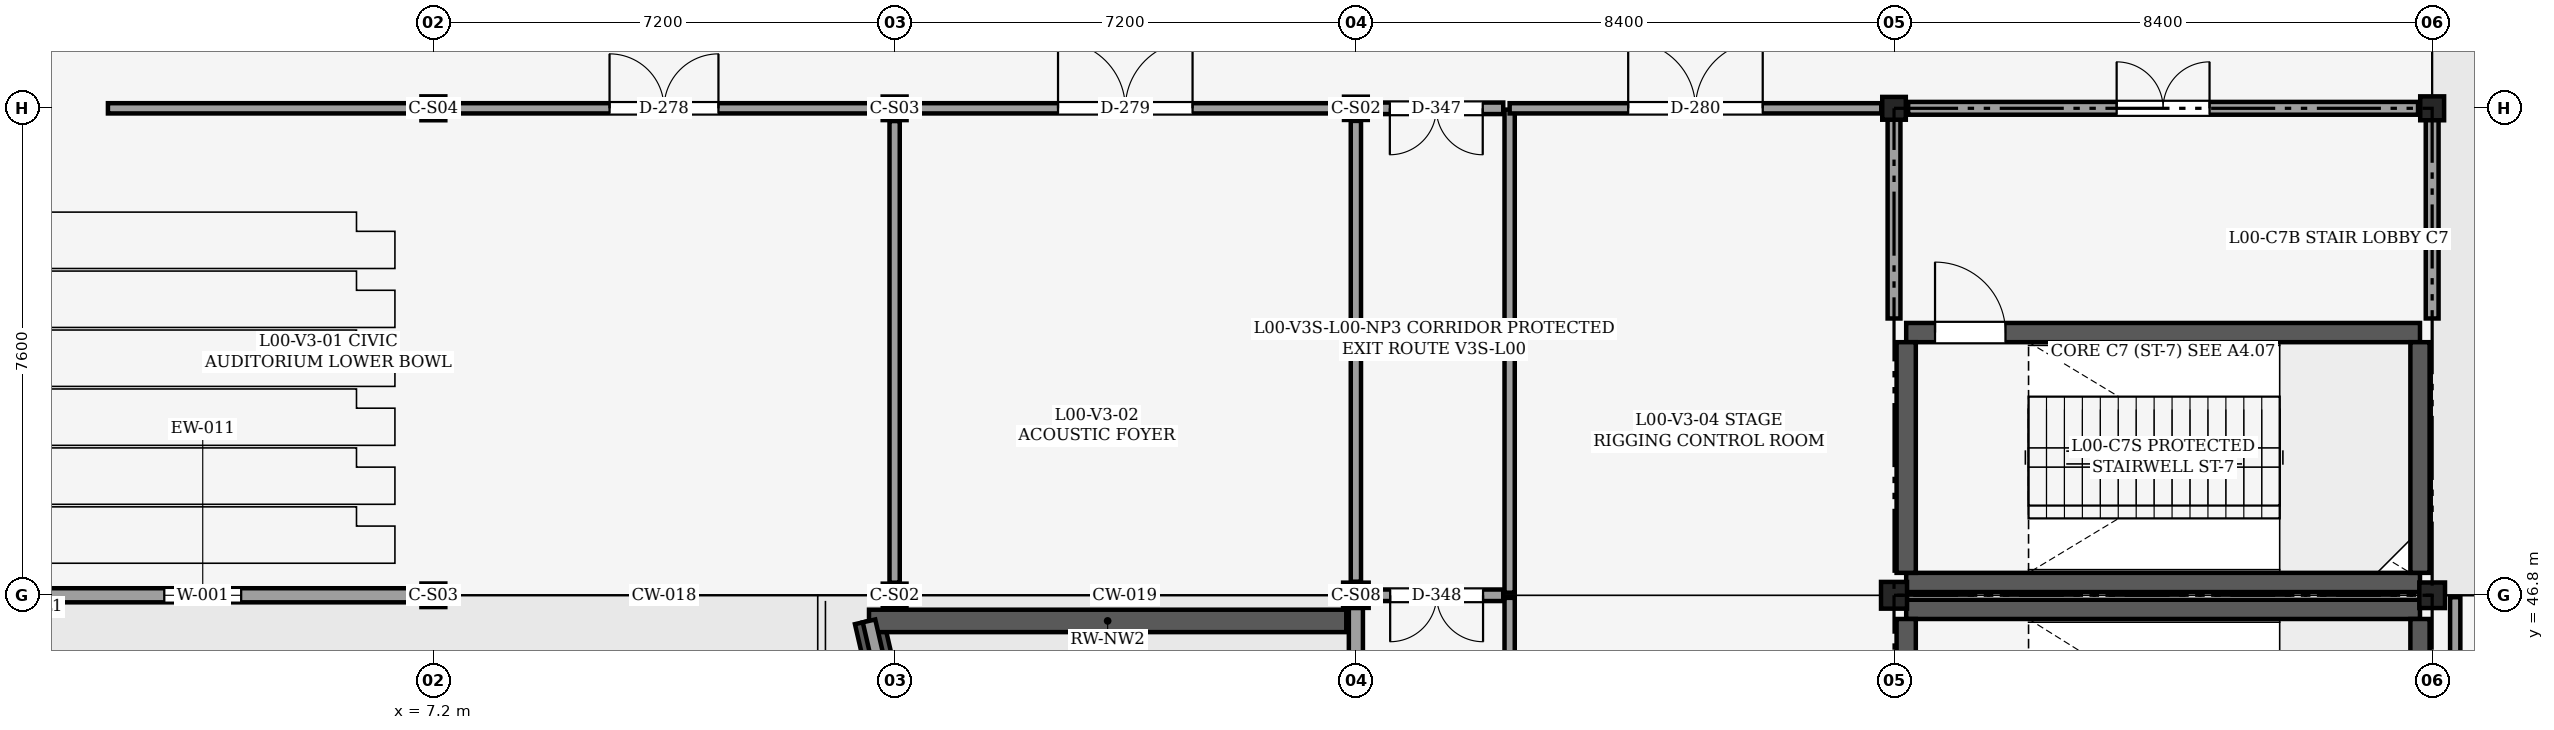
"""IFC4 building model, lengths in metres.
Left out: names, types, materials, properties, quantities, classifications, styles, units other than length and angle.
Written with IfcOpenShell. Run it as: python <this file> out.ifc"""

import sys

from ifc_helpers import new_model, si_unit, direction, frame, frame_2d, origin, origin_2d, place, context, subcontext, project, spatial, rectangle, i_section, extrude, element, fill, save


model = new_model("IFC4")
c1 = context("Model", 3, precision=1e-05, world=origin(), true_north=direction((0.0, 1.0)))
c2 = subcontext(c1, "Body", "Model", "MODEL_VIEW")
j1 = project(units=[si_unit("LENGTHUNIT", "METRE"), si_unit("PLANEANGLEUNIT", "RADIAN")], contexts=[c1])
p1 = place(None, origin())
s1 = spatial("IfcSite", under=j1, at=p1, CompositionType="ELEMENT")
p2 = place(p1, origin())
s2 = spatial("IfcBuilding", under=s1, at=p2, CompositionType="ELEMENT")
p3 = place(p2, origin())
s3 = spatial("IfcBuildingStorey", under=s2, at=p3, CompositionType="ELEMENT", Elevation=0.0)
p4 = place(p3, frame((7.2, 46.8, 0.0), z_axis=(0.0, 0.0, 1.0), x_axis=(1.0, 0.0, 0.0)))
e1 = element("IfcColumn", 1, at=p4, inside=s3, PredefinedType="COLUMN", context=c2, shape_type="SweptSolid", body=[
    extrude(i_section(OverallWidth=0.373, OverallDepth=0.368, WebThickness=0.015, FlangeThickness=0.024, FilletRadius=0.025, at=origin_2d()), origin(), (0.0, 0.0, 1.0), 5.4),
])
p5 = place(p3, frame((7.2, 54.4, 0.0), z_axis=(0.0, 0.0, 1.0), x_axis=(1.0, 0.0, 0.0)))
e2 = element("IfcColumn", 2, at=p5, inside=s3, PredefinedType="COLUMN", context=c2, shape_type="SweptSolid", body=[
    extrude(i_section(OverallWidth=0.373, OverallDepth=0.373, WebThickness=0.016, FlangeThickness=0.026, FilletRadius=0.025, at=origin_2d()), origin(), (0.0, 0.0, 1.0), 5.4),
])
p6 = place(p3, frame((14.4, 46.8, 0.0), z_axis=(0.0, 0.0, 1.0), x_axis=(1.0, 0.0, 0.0)))
e3 = element("IfcColumn", 3, at=p6, inside=s3, PredefinedType="COLUMN", context=c2, shape_type="SweptSolid", body=[
    extrude(i_section(OverallWidth=0.371, OverallDepth=0.363, WebThickness=0.013, FlangeThickness=0.022, FilletRadius=0.025, at=origin_2d()), origin(), (0.0, 0.0, 1.0), 5.4),
])
p7 = place(p3, frame((14.4, 54.4, 0.0), z_axis=(0.0, 0.0, 1.0), x_axis=(1.0, 0.0, 0.0)))
e4 = element("IfcColumn", 4, at=p7, inside=s3, PredefinedType="COLUMN", context=c2, shape_type="SweptSolid", body=[
    extrude(i_section(OverallWidth=0.373, OverallDepth=0.368, WebThickness=0.015, FlangeThickness=0.024, FilletRadius=0.025, at=origin_2d()), origin(), (0.0, 0.0, 1.0), 5.4),
])
p8 = place(p3, frame((21.6, 46.8, 0.0), z_axis=(0.0, 0.0, 1.0), x_axis=(1.0, 0.0, 0.0)))
e5 = element("IfcColumn", 5, at=p8, inside=s3, PredefinedType="COLUMN", context=c2, shape_type="SweptSolid", body=[
    extrude(i_section(OverallWidth=0.399, OverallDepth=0.394, WebThickness=0.023, FlangeThickness=0.037, FilletRadius=0.025, at=origin_2d()), origin(), (0.0, 0.0, 1.0), 5.4),
])
p9 = place(p3, frame((21.6, 54.4, 0.0), z_axis=(0.0, 0.0, 1.0), x_axis=(1.0, 0.0, 0.0)))
e6 = element("IfcColumn", 6, at=p9, inside=s3, PredefinedType="COLUMN", context=c2, shape_type="SweptSolid", body=[
    extrude(i_section(OverallWidth=0.371, OverallDepth=0.363, WebThickness=0.013, FlangeThickness=0.022, FilletRadius=0.025, at=origin_2d()), origin(), (0.0, 0.0, 1.0), 5.4),
])
p10 = place(p3, frame((30.0, 46.8, 0.0), z_axis=(0.0, 0.0, 1.0), x_axis=(1.0, 0.0, 0.0)))
e7 = element("IfcColumn", 7, at=p10, inside=s3, PredefinedType="COLUMN", context=c2, shape_type="SweptSolid", body=[
    extrude(i_section(OverallWidth=0.406, OverallDepth=0.417, WebThickness=0.03, FlangeThickness=0.048, FilletRadius=0.025, at=origin_2d()), origin(), (0.0, 0.0, 1.0), 5.4),
])
p11 = place(p3, frame((30.0, 54.4, 0.0), z_axis=(0.0, 0.0, 1.0), x_axis=(1.0, 0.0, 0.0)))
e8 = element("IfcColumn", 8, at=p11, inside=s3, PredefinedType="COLUMN", context=c2, shape_type="SweptSolid", body=[
    extrude(i_section(OverallWidth=0.368, OverallDepth=0.356, WebThickness=0.011, FlangeThickness=0.018, FilletRadius=0.025, at=origin_2d()), origin(), (0.0, 0.0, 1.0), 5.4),
])
p12 = place(p3, frame((38.4, 46.8, 0.0), z_axis=(0.0, 0.0, 1.0), x_axis=(1.0, 0.0, 0.0)))
e9 = element("IfcColumn", 9, at=p12, inside=s3, PredefinedType="COLUMN", context=c2, shape_type="SweptSolid", body=[
    extrude(i_section(OverallWidth=0.401, OverallDepth=0.399, WebThickness=0.025, FlangeThickness=0.04, FilletRadius=0.025, at=origin_2d()), origin(), (0.0, 0.0, 1.0), 5.4),
])
p13 = place(p3, frame((38.4, 54.4, 0.0), z_axis=(0.0, 0.0, 1.0), x_axis=(1.0, 0.0, 0.0)))
e10 = element("IfcColumn", 10, at=p13, inside=s3, PredefinedType="COLUMN", context=c2, shape_type="SweptSolid", body=[
    extrude(i_section(OverallWidth=0.373, OverallDepth=0.373, WebThickness=0.016, FlangeThickness=0.026, FilletRadius=0.025, at=origin_2d()), origin(), (0.0, 0.0, 1.0), 5.4),
])
p14 = place(p3, frame((14.0, 46.4, 0.0), z_axis=(0.0, 0.0, 1.0), x_axis=(0.224870644034, -0.974388625473, 0.0)))
e11 = element("IfcWall", 11, at=p14, inside=s3, PredefinedType="USERDEFINED", context=c2, shape_type="SweptSolid", body=[
    extrude(rectangle(XDim=8.005, YDim=0.45, at=frame_2d((4.002, 0.0))), origin(), (0.0, 0.0, 1.0), 4.0),
])
p15 = place(p14, frame((2.702, 0.0, 0.85)))
e12 = element("IfcOpeningElement", 12, at=p15, cuts=e11, PredefinedType="OPENING", context=c2, shape_type="SweptSolid", body=[
    extrude(rectangle(XDim=2.6, YDim=1.9, at=frame_2d((1.3, 0.95))), frame((0.0, 0.235, 0.0), z_axis=(0.0, -1.0, 0.0), x_axis=(1.0, 0.0, 0.0)), (0.0, 0.0, 1.0), 0.47),
])
p16 = place(p3, frame((21.45, 46.4, 0.0), z_axis=(0.0, 0.0, 1.0), x_axis=(-1.0, 0.0, 0.0)))
e13 = element("IfcWall", 13, at=p16, inside=s3, PredefinedType="USERDEFINED", context=c2, shape_type="SweptSolid", body=[
    extrude(rectangle(XDim=7.45, YDim=0.35, at=frame_2d((3.725, 0.0))), origin(), (0.0, 0.0, 1.0), 4.0),
])
p17 = place(p3, frame((14.0, 46.4, 4.2), z_axis=(0.0, 0.0, 1.0), x_axis=(0.224870644034, -0.974388625473, 0.0)))
e14 = element("IfcWall", 14, at=p17, inside=s3, PredefinedType="PARAPET", context=c2, shape_type="SweptSolid", body=[
    extrude(rectangle(XDim=8.005, YDim=0.2, at=frame_2d((4.002, 0.0))), origin(), (0.0, 0.0, 1.0), 0.65),
])
p18 = place(p3, frame((7.013, 46.8, 0.0), z_axis=(0.0, 0.0, 1.0), x_axis=(-1.0, 0.0, 0.0)))
e15 = element("IfcWall", 15, at=p18, inside=s3, PredefinedType="SOLIDWALL", context=c2, shape_type="SweptSolid", body=[
    extrude(rectangle(XDim=6.827, YDim=0.22, at=frame_2d((3.414, 0.0))), origin(), (0.0, 0.0, 1.0), 4.533),
])
p19 = place(p18, frame((2.813, 0.0, 0.9)))
e16 = element("IfcOpeningElement", 16, at=p19, cuts=e15, PredefinedType="OPENING", context=c2, shape_type="SweptSolid", body=[
    extrude(rectangle(XDim=1.2, YDim=1.5, at=frame_2d((0.6, 0.75))), frame((0.0, 0.12, 0.0), z_axis=(0.0, -1.0, 0.0), x_axis=(1.0, 0.0, 0.0)), (0.0, 0.0, 1.0), 0.24),
])
p20 = place(p3, frame((21.6, 38.593, 0.0), z_axis=(0.0, 0.0, 1.0), x_axis=(0.0, 1.0, 0.0)))
e17 = element("IfcWall", 17, at=p20, inside=s3, PredefinedType="SOLIDWALL", context=c2, shape_type="SweptSolid", body=[
    extrude(rectangle(XDim=8.01, YDim=0.22, at=frame_2d((4.005, 0.0))), origin(), (0.0, 0.0, 1.0), 4.213),
])
p21 = place(p20, frame((3.205, 0.0, 0.0)))
e18 = element("IfcOpeningElement", 18, at=p21, cuts=e17, PredefinedType="OPENING", context=c2, shape_type="SweptSolid", body=[
    extrude(rectangle(XDim=1.6, YDim=2.25, at=frame_2d((0.8, 1.125))), frame((0.0, 0.12, 0.0), z_axis=(0.0, -1.0, 0.0), x_axis=(1.0, 0.0, 0.0)), (0.0, 0.0, 1.0), 0.24),
])
p22 = place(p3, frame((30.19, 46.58, 0.0), z_axis=(0.0, 0.0, 1.0), x_axis=(1.0, 0.0, 0.0)))
e19 = element("IfcWall", 19, at=p22, inside=s3, PredefinedType="SHEAR", context=c2, shape_type="SweptSolid", body=[
    extrude(rectangle(XDim=8.02, YDim=0.3, at=frame_2d((4.01, 0.0))), origin(), (0.0, 0.0, 1.0), 5.16),
])
for number, where, z_axis, x_axis in (
    (20, (30.19, 42.71, 0.0), (0.0, 0.0, 1.0), (0.0, 1.0, 0.0)),
    (21, (38.21, 42.71, 0.0), (0.0, 0.0, 1.0), (0.0, 1.0, 0.0)),
):
    element("IfcWall", number, at=place(p3, frame(where, z_axis=z_axis, x_axis=x_axis)), inside=s3, PredefinedType="SHEAR", context=c2, shape_type="SweptSolid", body=[
        extrude(rectangle(XDim=3.72, YDim=0.3, at=frame_2d((1.86, 0.0))), origin(), (0.0, 0.0, 1.0), 5.16),
    ])
p23 = place(p3, frame((30.19, 47.0, 0.0), z_axis=(0.0, 0.0, 1.0), x_axis=(1.0, 0.0, 0.0)))
e22 = element("IfcWall", 22, at=p23, inside=s3, PredefinedType="SHEAR", context=c2, shape_type="SweptSolid", body=[
    extrude(rectangle(XDim=8.02, YDim=0.3, at=frame_2d((4.01, 0.0))), origin(), (0.0, 0.0, 1.0), 5.16),
])
p24 = place(p3, frame((30.19, 50.9, 0.0), z_axis=(0.0, 0.0, 1.0), x_axis=(1.0, 0.0, 0.0)))
e23 = element("IfcWall", 23, at=p24, inside=s3, PredefinedType="SHEAR", context=c2, shape_type="SweptSolid", body=[
    extrude(rectangle(XDim=8.02, YDim=0.3, at=frame_2d((4.01, 0.0))), origin(), (0.0, 0.0, 1.0), 5.16),
])
p25 = place(p24, frame((0.45, 0.0, 0.0)))
e24 = element("IfcOpeningElement", 24, at=p25, cuts=e23, PredefinedType="OPENING", context=c2, shape_type="SweptSolid", body=[
    extrude(rectangle(XDim=1.1, YDim=2.15, at=frame_2d((0.55, 1.075))), frame((0.0, 0.16, 0.0), z_axis=(0.0, -1.0, 0.0), x_axis=(1.0, 0.0, 0.0)), (0.0, 0.0, 1.0), 0.321),
])
for number, where, z_axis, x_axis in (
    (25, (30.19, 47.15, 0.0), (0.0, 0.0, 1.0), (0.0, 1.0, 0.0)),
    (26, (38.21, 47.15, 0.0), (0.0, 0.0, 1.0), (0.0, 1.0, 0.0)),
):
    element("IfcWall", number, at=place(p3, frame(where, z_axis=z_axis, x_axis=x_axis)), inside=s3, PredefinedType="SHEAR", context=c2, shape_type="SweptSolid", body=[
        extrude(rectangle(XDim=3.6, YDim=0.3, at=frame_2d((1.8, 0.0))), origin(), (0.0, 0.0, 1.0), 5.16),
    ])
p26 = place(p3, frame((30.0, 51.12, 0.0), z_axis=(0.0, 0.0, 1.0), x_axis=(0.0, 1.0, 0.0)))
e27 = element("IfcWall", 27, at=p26, inside=s3, PredefinedType="PARTITIONING", context=c2, shape_type="SweptSolid", body=[
    extrude(rectangle(XDim=3.26, YDim=0.2, at=frame_2d((1.63, 0.0))), origin(), (0.0, 0.0, 1.0), 4.528),
])
p27 = place(p3, frame((38.4, 51.12, 0.0), z_axis=(0.0, 0.0, 1.0), x_axis=(0.0, 1.0, 0.0)))
e28 = element("IfcWall", 28, at=p27, inside=s3, PredefinedType="PARTITIONING", context=c2, shape_type="SweptSolid", body=[
    extrude(rectangle(XDim=3.26, YDim=0.2, at=frame_2d((1.63, 0.0))), origin(), (0.0, 0.0, 1.0), 4.533),
])
p28 = place(p3, frame((30.22, 54.4, 0.0), z_axis=(0.0, 0.0, 1.0), x_axis=(1.0, 0.0, 0.0)))
e29 = element("IfcWall", 29, at=p28, inside=s3, PredefinedType="PARTITIONING", context=c2, shape_type="SweptSolid", body=[
    extrude(rectangle(XDim=7.96, YDim=0.2, at=frame_2d((3.98, 0.0))), origin(), (0.0, 0.0, 1.0), 4.518),
])
p29 = place(p28, frame((3.255, 0.0, 0.0)))
e30 = element("IfcOpeningElement", 30, at=p29, cuts=e29, PredefinedType="OPENING", context=c2, shape_type="SweptSolid", body=[
    extrude(rectangle(XDim=1.45, YDim=2.2, at=frame_2d((0.725, 1.1))), frame((0.0, 0.11, 0.0), z_axis=(0.0, -1.0, 0.0), x_axis=(1.0, 0.0, 0.0)), (0.0, 0.0, 1.0), 0.22),
])
p30 = place(p3, frame((24.0, 38.42, 0.0), z_axis=(0.0, 0.0, 1.0), x_axis=(0.0, 1.0, 0.0)))
e31 = element("IfcWall", 31, at=p30, inside=s3, PredefinedType="PARTITIONING", context=c2, shape_type="SweptSolid", body=[
    extrude(rectangle(XDim=8.34, YDim=0.16, at=frame_2d((4.17, 0.0))), origin(), (0.0, 0.0, 1.0), 5.14),
])
p31 = place(p3, frame((38.76, 38.41, 0.0), z_axis=(0.0, 0.0, 1.0), x_axis=(0.0, 1.0, 0.0)))
e32 = element("IfcWall", 32, at=p31, inside=s3, PredefinedType="PARTITIONING", context=c2, shape_type="SweptSolid", body=[
    extrude(rectangle(XDim=8.36, YDim=0.16, at=frame_2d((4.18, 0.0))), origin(), (0.0, 0.0, 1.0), 5.14),
])
p32 = place(p3, frame((2.12, 54.4, 0.0), z_axis=(0.0, 0.0, 1.0), x_axis=(1.0, 0.0, 0.0)))
e33 = element("IfcWall", 33, at=p32, inside=s3, PredefinedType="PARTITIONING", context=c2, shape_type="SweptSolid", body=[
    extrude(rectangle(XDim=4.878, YDim=0.16, at=frame_2d((2.439, 0.0))), origin(), (0.0, 0.0, 1.0), 4.591),
])
p33 = place(p3, frame((7.402, 54.4, 0.0), z_axis=(0.0, 0.0, 1.0), x_axis=(1.0, 0.0, 0.0)))
e34 = element("IfcWall", 34, at=p33, inside=s3, PredefinedType="PARTITIONING", context=c2, shape_type="SweptSolid", body=[
    extrude(rectangle(XDim=6.797, YDim=0.16, at=frame_2d((3.398, 0.0))), origin(), (0.0, 0.0, 1.0), 4.607),
])
p34 = place(p33, frame((2.549, 0.0, 0.0)))
e35 = element("IfcOpeningElement", 35, at=p34, cuts=e34, PredefinedType="OPENING", context=c2, shape_type="SweptSolid", body=[
    extrude(rectangle(XDim=1.7, YDim=2.4, at=frame_2d((0.85, 1.2))), frame((0.0, 0.09, 0.0), z_axis=(0.0, -1.0, 0.0), x_axis=(1.0, 0.0, 0.0)), (0.0, 0.0, 1.0), 0.18),
])
p35 = place(p3, frame((14.4, 46.997, 0.0), z_axis=(0.0, 0.0, 1.0), x_axis=(0.0, 1.0, 0.0)))
e36 = element("IfcWall", 36, at=p35, inside=s3, PredefinedType="PARTITIONING", context=c2, shape_type="SweptSolid", body=[
    extrude(rectangle(XDim=7.204, YDim=0.16, at=frame_2d((3.602, 0.0))), origin(), (0.0, 0.0, 1.0), 4.607),
])
p36 = place(p3, frame((14.602, 54.4, 0.0), z_axis=(0.0, 0.0, 1.0), x_axis=(1.0, 0.0, 0.0)))
e37 = element("IfcWall", 37, at=p36, inside=s3, PredefinedType="PARTITIONING", context=c2, shape_type="SweptSolid", body=[
    extrude(rectangle(XDim=6.798, YDim=0.16, at=frame_2d((3.399, 0.0))), origin(), (0.0, 0.0, 1.0), 4.678),
])
p37 = place(p36, frame((2.349, 0.0, 0.0)))
e38 = element("IfcOpeningElement", 38, at=p37, cuts=e37, PredefinedType="OPENING", context=c2, shape_type="SweptSolid", body=[
    extrude(rectangle(XDim=2.1, YDim=2.5, at=frame_2d((1.05, 1.25))), frame((0.0, 0.09, 0.0), z_axis=(0.0, -1.0, 0.0), x_axis=(1.0, 0.0, 0.0)), (0.0, 0.0, 1.0), 0.18),
])
p38 = place(p3, frame((21.6, 47.012, 0.0), z_axis=(0.0, 0.0, 1.0), x_axis=(0.0, 1.0, 0.0)))
e39 = element("IfcWall", 39, at=p38, inside=s3, PredefinedType="PARTITIONING", context=c2, shape_type="SweptSolid", body=[
    extrude(rectangle(XDim=7.192, YDim=0.16, at=frame_2d((3.596, 0.0))), origin(), (0.0, 0.0, 1.0), 4.678),
])
p39 = place(p3, frame((24.0, 46.84, 0.0), z_axis=(0.0, 0.0, 1.0), x_axis=(0.0, 1.0, 0.0)))
e40 = element("IfcWall", 40, at=p39, inside=s3, PredefinedType="PARTITIONING", context=c2, shape_type="SweptSolid", body=[
    extrude(rectangle(XDim=7.54, YDim=0.16, at=frame_2d((3.77, 0.0))), origin(), (0.0, 0.0, 1.0), 5.14),
])
p40 = place(p3, frame((24.0, 54.4, 0.0), z_axis=(0.0, 0.0, 1.0), x_axis=(1.0, 0.0, 0.0)))
e41 = element("IfcWall", 41, at=p40, inside=s3, PredefinedType="PARTITIONING", context=c2, shape_type="SweptSolid", body=[
    extrude(rectangle(XDim=5.801, YDim=0.16, at=frame_2d((2.9, 0.0))), origin(), (0.0, 0.0, 1.0), 4.447),
])
p41 = place(p40, frame((1.851, 0.0, 0.0)))
e42 = element("IfcOpeningElement", 42, at=p41, cuts=e41, PredefinedType="OPENING", context=c2, shape_type="SweptSolid", body=[
    extrude(rectangle(XDim=2.1, YDim=2.5, at=frame_2d((1.05, 1.25))), frame((0.0, 0.09, 0.0), z_axis=(0.0, -1.0, 0.0), x_axis=(1.0, 0.0, 0.0)), (0.0, 0.0, 1.0), 0.18),
])
p42 = place(p3, frame((23.9, 54.4, 0.0), z_axis=(0.0, 0.0, 1.0), x_axis=(-1.0, 0.0, 0.0)))
e43 = element("IfcWall", 43, at=p42, inside=s3, PredefinedType="PARTITIONING", context=c2, shape_type="SweptSolid", body=[
    extrude(rectangle(XDim=2.09, YDim=0.18, at=frame_2d((1.045, 0.0))), origin(), (0.0, 0.0, 1.0), 4.447),
])
p43 = place(p42, frame((0.32, 0.0, 0.0)))
e44 = element("IfcOpeningElement", 44, at=p43, cuts=e43, PredefinedType="OPENING", context=c2, shape_type="SweptSolid", body=[
    extrude(rectangle(XDim=1.45, YDim=2.2, at=frame_2d((0.725, 1.1))), frame((0.0, 0.1, 0.0), z_axis=(0.0, -1.0, 0.0), x_axis=(1.0, 0.0, 0.0)), (0.0, 0.0, 1.0), 0.2),
])
p44 = place(p3, frame((23.9, 46.8, 0.0), z_axis=(0.0, 0.0, 1.0), x_axis=(-1.0, 0.0, 0.0)))
e45 = element("IfcWall", 45, at=p44, inside=s3, PredefinedType="PARTITIONING", context=c2, shape_type="SweptSolid", body=[
    extrude(rectangle(XDim=2.08, YDim=0.18, at=frame_2d((1.04, 0.0))), origin(), (0.0, 0.0, 1.0), 4.378),
])
p45 = place(p44, frame((0.315, 0.0, 0.0)))
e46 = element("IfcOpeningElement", 46, at=p45, cuts=e45, PredefinedType="OPENING", context=c2, shape_type="SweptSolid", body=[
    extrude(rectangle(XDim=1.45, YDim=2.2, at=frame_2d((0.725, 1.1))), frame((0.0, 0.1, 0.0), z_axis=(0.0, -1.0, 0.0), x_axis=(1.0, 0.0, 0.0)), (0.0, 0.0, 1.0), 0.2),
])
p46 = place(p19, origin())
e47 = element("IfcWindow", 47, at=p46, inside=s3, PartitioningType="SINGLE_PANEL", PredefinedType="WINDOW", context=c2, shape_type="SweptSolid", body=[
    extrude(rectangle(XDim=1.2, YDim=1.5, at=frame_2d((0.6, 0.75))), frame((0.0, 0.03, 0.0), z_axis=(0.0, -1.0, 0.0), x_axis=(1.0, 0.0, 0.0)), (0.0, 0.0, 1.0), 0.06),
])
fill(e16, e47)
p47 = place(p25, origin())
e48 = element("IfcDoor", 48, at=p47, inside=s3, OperationType="SINGLE_SWING_LEFT", PredefinedType="DOOR", context=c2, shape_type="SweptSolid", body=[
    extrude(rectangle(XDim=1.1, YDim=2.15, at=frame_2d((0.55, 1.075))), frame((0.0, 0.025, 0.0), z_axis=(0.0, -1.0, 0.0), x_axis=(1.0, 0.0, 0.0)), (0.0, 0.0, 1.0), 0.05),
])
fill(e24, e48)
p48 = place(p29, origin())
e49 = element("IfcDoor", 49, at=p48, inside=s3, OperationType="DOUBLE_DOOR_SINGLE_SWING", PredefinedType="DOOR", context=c2, shape_type="SweptSolid", body=[
    extrude(rectangle(XDim=1.45, YDim=2.2, at=frame_2d((0.725, 1.1))), frame((0.0, 0.025, 0.0), z_axis=(0.0, -1.0, 0.0), x_axis=(1.0, 0.0, 0.0)), (0.0, 0.0, 1.0), 0.05),
])
fill(e30, e49)
p49 = place(p34, origin())
e50 = element("IfcDoor", 50, at=p49, inside=s3, OperationType="DOUBLE_DOOR_SINGLE_SWING", PredefinedType="DOOR", context=c2, shape_type="SweptSolid", body=[
    extrude(rectangle(XDim=1.7, YDim=2.4, at=frame_2d((0.85, 1.2))), frame((0.0, 0.025, 0.0), z_axis=(0.0, -1.0, 0.0), x_axis=(1.0, 0.0, 0.0)), (0.0, 0.0, 1.0), 0.05),
])
fill(e35, e50)
p50 = place(p37, origin())
e51 = element("IfcDoor", 51, at=p50, inside=s3, OperationType="DOUBLE_DOOR_SINGLE_SWING", PredefinedType="DOOR", context=c2, shape_type="SweptSolid", body=[
    extrude(rectangle(XDim=2.1, YDim=2.5, at=frame_2d((1.05, 1.25))), frame((0.0, 0.025, 0.0), z_axis=(0.0, -1.0, 0.0), x_axis=(1.0, 0.0, 0.0)), (0.0, 0.0, 1.0), 0.05),
])
fill(e38, e51)
p51 = place(p41, origin())
e52 = element("IfcDoor", 52, at=p51, inside=s3, OperationType="DOUBLE_DOOR_SINGLE_SWING", PredefinedType="DOOR", context=c2, shape_type="SweptSolid", body=[
    extrude(rectangle(XDim=2.1, YDim=2.5, at=frame_2d((1.05, 1.25))), frame((0.0, 0.025, 0.0), z_axis=(0.0, -1.0, 0.0), x_axis=(1.0, 0.0, 0.0)), (0.0, 0.0, 1.0), 0.05),
])
fill(e42, e52)
p52 = place(p43, origin())
e53 = element("IfcDoor", 53, at=p52, inside=s3, OperationType="DOUBLE_DOOR_SINGLE_SWING", PredefinedType="DOOR", context=c2, shape_type="SweptSolid", body=[
    extrude(rectangle(XDim=1.45, YDim=2.2, at=frame_2d((0.725, 1.1))), frame((0.0, 0.025, 0.0), z_axis=(0.0, -1.0, 0.0), x_axis=(1.0, 0.0, 0.0)), (0.0, 0.0, 1.0), 0.05),
])
fill(e44, e53)
p53 = place(p45, origin())
e54 = element("IfcDoor", 54, at=p53, inside=s3, OperationType="DOUBLE_DOOR_SINGLE_SWING", PredefinedType="DOOR", context=c2, shape_type="SweptSolid", body=[
    extrude(rectangle(XDim=1.45, YDim=2.2, at=frame_2d((0.725, 1.1))), frame((0.0, 0.025, 0.0), z_axis=(0.0, -1.0, 0.0), x_axis=(1.0, 0.0, 0.0)), (0.0, 0.0, 1.0), 0.05),
])
fill(e46, e54)
save(model, sys.argv[1])
